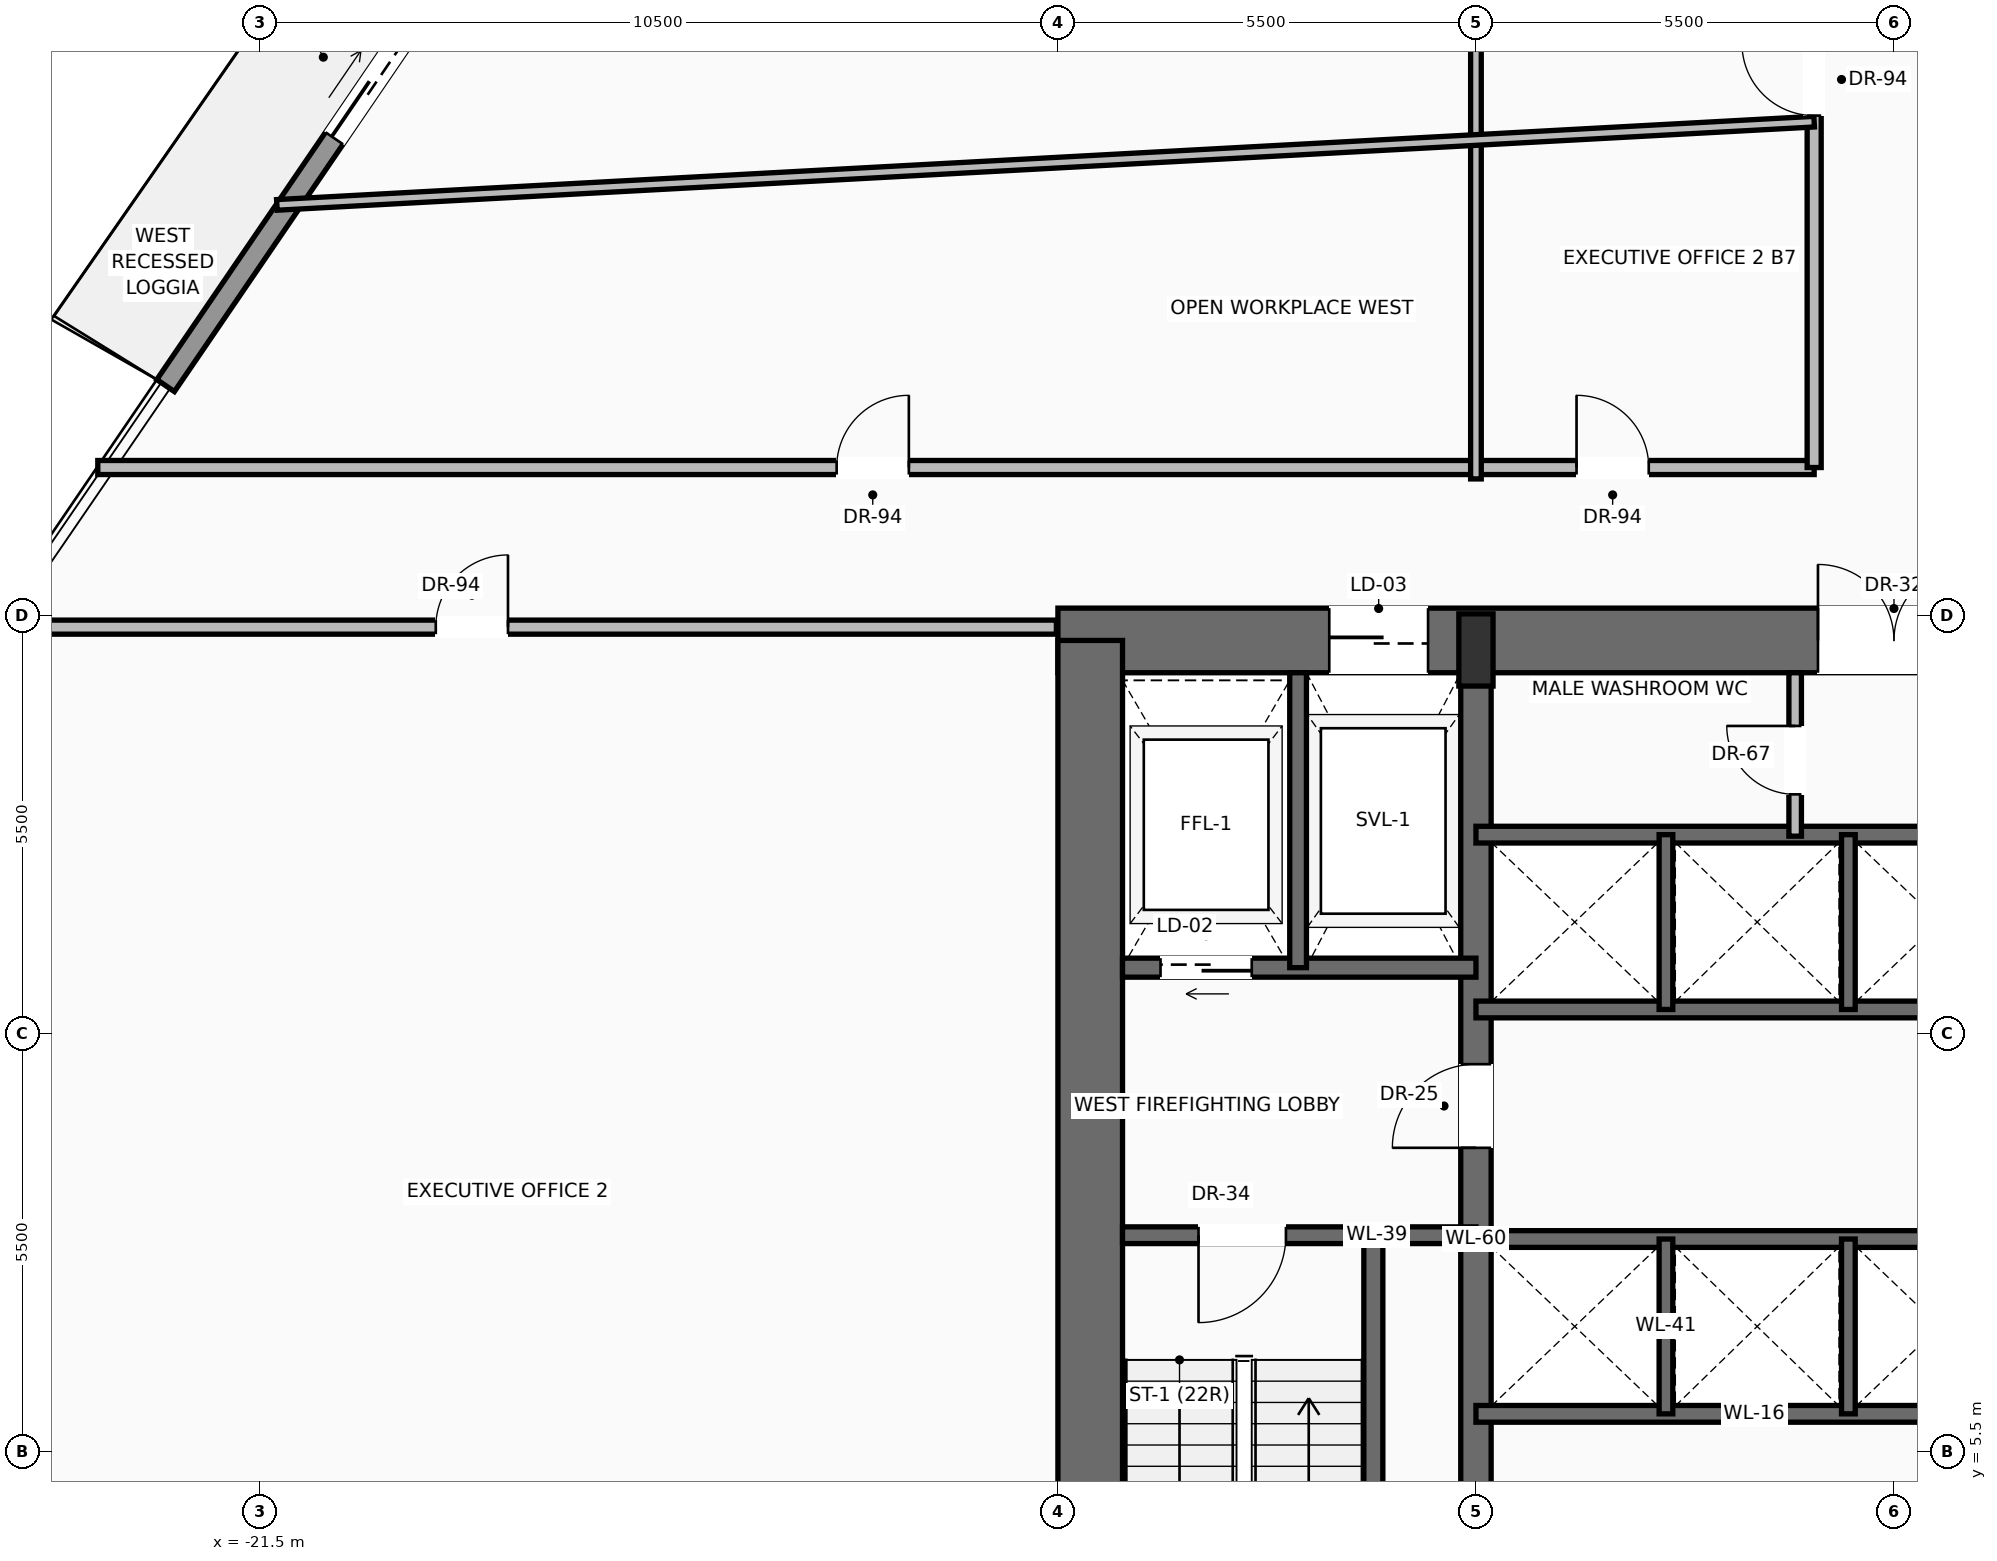
"""IFC4 building model, lengths in metres.
Left out: names, types, materials, properties, quantities, classifications, styles, units other than length and angle.
Written with IfcOpenShell. Run it as: python <this file> out.ifc"""

import sys

from ifc_helpers import new_model, si_unit, direction, frame, frame_2d, origin, origin_2d, place, context, subcontext, project, spatial, rectangle, extrude, source, transform, mapped, element, fill, save


model = new_model("IFC4")
c1 = context("Model", 3, precision=1e-05, world=origin(), true_north=direction((0.0, 1.0)))
c2 = subcontext(c1, "Body", "Model", "MODEL_VIEW")
j1 = project(units=[si_unit("LENGTHUNIT", "METRE"), si_unit("PLANEANGLEUNIT", "RADIAN")], contexts=[c1])
p1 = place(None, origin())
s1 = spatial("IfcSite", under=j1, at=p1, CompositionType="ELEMENT")
p2 = place(p1, origin())
s2 = spatial("IfcBuilding", under=s1, at=p2, CompositionType="ELEMENT")
p3 = place(p2, frame((0.0, 0.0, 34.9)))
s3 = spatial("IfcBuildingStorey", under=s2, at=p3, CompositionType="ELEMENT", Elevation=34.9)
p4 = place(p3, frame((-11.0, 16.175, 0.0), z_axis=(0.0, 0.0, 1.0), x_axis=(1.0, 0.0, 0.0)))
e1 = element("IfcWall", 1, at=p4, inside=s3, PredefinedType="SHEAR", context=c2, shape_type="SweptSolid", body=[
    extrude(rectangle(XDim=22.0, YDim=0.85, at=frame_2d((11.0, 0.0))), origin(), (0.0, 0.0, 1.0), 3.45),
])
p5 = place(p4, frame((3.57, 0.0, 0.0)))
e2 = element("IfcOpeningElement", 2, at=p5, cuts=e1, PredefinedType="OPENING", context=c2, shape_type="SweptSolid", body=[
    extrude(rectangle(XDim=1.3, YDim=2.3, at=frame_2d((0.65, 1.15))), frame((0.0, 0.435, 0.0), z_axis=(0.0, -1.0, 0.0), x_axis=(1.0, 0.0, 0.0)), (0.0, 0.0, 1.0), 0.87),
])
p6 = place(p4, frame((10.0, 0.0, 0.0)))
e3 = element("IfcOpeningElement", 3, at=p6, cuts=e1, PredefinedType="OPENING", context=c2, shape_type="SweptSolid", body=[
    extrude(rectangle(XDim=2.0, YDim=2.4, at=frame_2d((1.0, 1.2))), frame((0.0, 0.435, 0.0), z_axis=(0.0, -1.0, 0.0), x_axis=(1.0, 0.0, 0.0)), (0.0, 0.0, 1.0), 0.87),
])
p7 = place(p3, frame((-10.575, 0.425, 0.0), z_axis=(0.0, 0.0, 1.0), x_axis=(0.0, 1.0, 0.0)))
e4 = element("IfcWall", 4, at=p7, inside=s3, PredefinedType="SHEAR", context=c2, shape_type="SweptSolid", body=[
    extrude(rectangle(XDim=15.75, YDim=0.85, at=frame_2d((7.875, 0.0))), origin(), (0.0, 0.0, 1.0), 3.45),
])
p8 = place(p3, frame((-5.5, 0.425, 0.0), z_axis=(0.0, 0.0, 1.0), x_axis=(0.0, 1.0, 0.0)))
e5 = element("IfcWall", 5, at=p8, inside=s3, PredefinedType="SHEAR", context=c2, shape_type="SweptSolid", body=[
    extrude(rectangle(XDim=15.75, YDim=0.4, at=frame_2d((7.875, 0.0))), origin(), (0.0, 0.0, 1.0), 3.45),
])
p9 = place(p8, frame((9.075, 0.0, 0.0)))
e6 = element("IfcOpeningElement", 6, at=p9, cuts=e5, PredefinedType="OPENING", context=c2, shape_type="SweptSolid", body=[
    extrude(rectangle(XDim=1.1, YDim=2.2, at=frame_2d((0.55, 1.1))), frame((0.0, 0.21, 0.0), z_axis=(0.0, -1.0, 0.0), x_axis=(1.0, 0.0, 0.0)), (0.0, 0.0, 1.0), 0.42),
])
m1 = source(origin(), c2, "Body", "SweptSolid", [
    extrude(rectangle(XDim=0.45, YDim=0.95, at=origin_2d()), origin(), (0.0, 0.0, 1.0), 3.7),
])
p10 = place(p3, frame((-5.5, 16.05, 0.0), z_axis=(0.0, 0.0, 1.0), x_axis=(1.0, 0.0, 0.0)))
e7 = element("IfcColumn", 7, at=p10, inside=s3, PredefinedType="PILASTER", context=c2, shape_type="MappedRepresentation", body=[
    mapped(m1, transform((0.0, 0.0, 0.0), scale=1.0)),
])
p11 = place(p3, frame((-22.74, 19.528, 0.0), z_axis=(0.0, 0.0, 1.0), x_axis=(0.563410685264, 0.826176978455, 0.0)))
e8 = element("IfcWall", 8, at=p11, inside=s3, PredefinedType="SOLIDWALL", context=c2, shape_type="SweptSolid", body=[
    extrude(rectangle(XDim=16.41, YDim=0.28, at=frame_2d((8.205, 0.0))), origin(), (0.0, 0.0, 1.0), 3.03),
])
p12 = place(p11, frame((3.938, 0.0, 0.0)))
e9 = element("IfcOpeningElement", 9, at=p12, cuts=e8, PredefinedType="OPENING", context=c2, shape_type="SweptSolid", body=[
    extrude(rectangle(XDim=1.6, YDim=2.35, at=frame_2d((0.8, 1.175))), frame((0.0, 0.15, 0.0), z_axis=(0.0, -1.0, 0.0), x_axis=(1.0, 0.0, 0.0)), (0.0, 0.0, 1.0), 0.3),
])
p13 = place(p11, frame((11.159, 0.0, 0.9)))
e10 = element("IfcOpeningElement", 10, at=p13, cuts=e8, PredefinedType="OPENING", context=c2, shape_type="SweptSolid", body=[
    extrude(rectangle(XDim=1.55, YDim=1.85, at=frame_2d((0.775, 0.925))), frame((0.0, 0.15, 0.0), z_axis=(0.0, -1.0, 0.0), x_axis=(1.0, 0.0, 0.0)), (0.0, 0.0, 1.0), 0.3),
])
p14 = place(p3, frame((-6.85, 0.85, 0.0), z_axis=(0.0, 0.0, 1.0), x_axis=(0.0, 1.0, 0.0)))
e11 = element("IfcWall", 11, at=p14, inside=s3, PredefinedType="SOLIDWALL", context=c2, shape_type="SweptSolid", body=[
    extrude(rectangle(XDim=7.5, YDim=0.25, at=frame_2d((3.75, 0.0))), origin(), (0.0, 0.0, 1.0), 3.45),
])
p15 = place(p3, frame((-5.5, 8.35, 0.0), z_axis=(0.0, 0.0, 1.0), x_axis=(-1.0, 0.0, 0.0)))
e12 = element("IfcWall", 12, at=p15, inside=s3, PredefinedType="SOLIDWALL", context=c2, shape_type="SweptSolid", body=[
    extrude(rectangle(XDim=4.65, YDim=0.22, at=frame_2d((2.325, 0.0))), origin(), (0.0, 0.0, 1.0), 3.45),
])
p16 = place(p15, frame((2.5, 0.0, 0.0)))
e13 = element("IfcOpeningElement", 13, at=p16, cuts=e12, PredefinedType="OPENING", context=c2, shape_type="SweptSolid", body=[
    extrude(rectangle(XDim=1.15, YDim=2.2, at=frame_2d((0.575, 1.1))), frame((0.0, 0.12, 0.0), z_axis=(0.0, -1.0, 0.0), x_axis=(1.0, 0.0, 0.0)), (0.0, 0.0, 1.0), 0.24),
])
p17 = place(p3, frame((-5.5, 11.87, 0.0), z_axis=(0.0, 0.0, 1.0), x_axis=(-1.0, 0.0, 0.0)))
e14 = element("IfcWall", 14, at=p17, inside=s3, PredefinedType="SOLIDWALL", context=c2, shape_type="SweptSolid", body=[
    extrude(rectangle(XDim=4.65, YDim=0.25, at=frame_2d((2.325, 0.0))), origin(), (0.0, 0.0, 1.0), 3.45),
])
p18 = place(p17, frame((2.95, 0.0, 0.0)))
e15 = element("IfcOpeningElement", 15, at=p18, cuts=e14, PredefinedType="OPENING", context=c2, shape_type="SweptSolid", body=[
    extrude(rectangle(XDim=1.2, YDim=2.25, at=frame_2d((0.6, 1.125))), frame((0.0, 0.135, 0.0), z_axis=(0.0, -1.0, 0.0), x_axis=(1.0, 0.0, 0.0)), (0.0, 0.0, 1.0), 0.27),
])
p19 = place(p3, frame((-7.84, 11.87, 0.0), z_axis=(0.0, 0.0, 1.0), x_axis=(0.0, 1.0, 0.0)))
e16 = element("IfcWall", 16, at=p19, inside=s3, PredefinedType="SOLIDWALL", context=c2, shape_type="SweptSolid", body=[
    extrude(rectangle(XDim=3.88, YDim=0.22, at=frame_2d((1.94, 0.0))), origin(), (0.0, 0.0, 1.0), 3.45),
])
for number, where, z_axis, x_axis in (
    (17, (-5.5, 6.0, 0.0), (0.0, 0.0, 1.0), (1.0, 0.0, 0.0)),
    (18, (-5.5, 8.3, 0.0), (0.0, 0.0, 1.0), (1.0, 0.0, 0.0)),
):
    element("IfcWall", number, at=place(p3, frame(where, z_axis=z_axis, x_axis=x_axis)), inside=s3, PredefinedType="SOLIDWALL", context=c2, shape_type="SweptSolid", body=[
        extrude(rectangle(XDim=7.32, YDim=0.22, at=frame_2d((3.66, 0.0))), origin(), (0.0, 0.0, 1.0), 3.45),
    ])
for number, where, z_axis, x_axis in (
    (19, (-3.0, 6.0, 0.0), (0.0, 0.0, 1.0), (0.0, 1.0, 0.0)),
    (20, (-0.6, 6.0, 0.0), (0.0, 0.0, 1.0), (0.0, 1.0, 0.0)),
):
    element("IfcWall", number, at=place(p3, frame(where, z_axis=z_axis, x_axis=x_axis)), inside=s3, PredefinedType="SOLIDWALL", context=c2, shape_type="SweptSolid", body=[
        extrude(rectangle(XDim=2.3, YDim=0.18, at=frame_2d((1.15, 0.0))), origin(), (0.0, 0.0, 1.0), 3.45),
    ])
for number, where, z_axis, x_axis in (
    (21, (-5.5, 11.32, 0.0), (0.0, 0.0, 1.0), (1.0, 0.0, 0.0)),
    (22, (-5.5, 13.62, 0.0), (0.0, 0.0, 1.0), (1.0, 0.0, 0.0)),
):
    element("IfcWall", number, at=place(p3, frame(where, z_axis=z_axis, x_axis=x_axis)), inside=s3, PredefinedType="SOLIDWALL", context=c2, shape_type="SweptSolid", body=[
        extrude(rectangle(XDim=7.32, YDim=0.22, at=frame_2d((3.66, 0.0))), origin(), (0.0, 0.0, 1.0), 3.45),
    ])
for number, where, z_axis, x_axis in (
    (23, (-3.0, 11.32, 0.0), (0.0, 0.0, 1.0), (0.0, 1.0, 0.0)),
    (24, (-0.6, 11.32, 0.0), (0.0, 0.0, 1.0), (0.0, 1.0, 0.0)),
):
    element("IfcWall", number, at=place(p3, frame(where, z_axis=z_axis, x_axis=x_axis)), inside=s3, PredefinedType="SOLIDWALL", context=c2, shape_type="SweptSolid", body=[
        extrude(rectangle(XDim=2.3, YDim=0.18, at=frame_2d((1.15, 0.0))), origin(), (0.0, 0.0, 1.0), 3.45),
    ])
p20 = place(p3, frame((-1.3, 13.6, 0.0), z_axis=(0.0, 0.0, 1.0), x_axis=(0.0, 1.0, 0.0)))
e25 = element("IfcWall", 25, at=p20, inside=s3, PredefinedType="PARTITIONING", context=c2, shape_type="SweptSolid", body=[
    extrude(rectangle(XDim=2.15, YDim=0.165, at=frame_2d((1.075, 0.0))), origin(), (0.0, 0.0, 1.0), 3.442),
])
p21 = place(p20, frame((0.55, 0.0, 0.0)))
e26 = element("IfcOpeningElement", 26, at=p21, cuts=e25, PredefinedType="OPENING", context=c2, shape_type="SweptSolid", body=[
    extrude(rectangle(XDim=0.9, YDim=2.1, at=frame_2d((0.45, 1.05))), frame((0.0, 0.093, 0.0), z_axis=(0.0, -1.0, 0.0), x_axis=(1.0, 0.0, 0.0)), (0.0, 0.0, 1.0), 0.185),
])
p22 = place(p3, frame((-25.064, 16.35, 0.0), z_axis=(0.0, 0.0, 1.0), x_axis=(1.0, 0.0, 0.0)))
e27 = element("IfcWall", 27, at=p22, inside=s3, PredefinedType="PARTITIONING", context=c2, shape_type="SweptSolid", body=[
    extrude(rectangle(XDim=14.044, YDim=0.185, at=frame_2d((7.022, 0.0))), origin(), (0.0, 0.0, 1.0), 2.747),
])
p23 = place(p22, frame((5.879, 0.0, 0.0)))
e28 = element("IfcOpeningElement", 28, at=p23, cuts=e27, PredefinedType="OPENING", context=c2, shape_type="SweptSolid", body=[
    extrude(rectangle(XDim=0.95, YDim=2.2, at=frame_2d((0.475, 1.1))), frame((0.0, 0.103, 0.0), z_axis=(0.0, -1.0, 0.0), x_axis=(1.0, 0.0, 0.0)), (0.0, 0.0, 1.0), 0.205),
])
p24 = place(p3, frame((-23.632, 18.45, 0.0), z_axis=(0.0, 0.0, 1.0), x_axis=(1.0, 0.0, 0.0)))
e29 = element("IfcWall", 29, at=p24, inside=s3, PredefinedType="PARTITIONING", context=c2, shape_type="SweptSolid", body=[
    extrude(rectangle(XDim=22.582, YDim=0.185, at=frame_2d((11.291, 0.0))), origin(), (0.0, 0.0, 1.0), 2.747),
])
p25 = place(p24, frame((9.721, 0.0, 0.0)))
e30 = element("IfcOpeningElement", 30, at=p25, cuts=e29, PredefinedType="OPENING", context=c2, shape_type="SweptSolid", body=[
    extrude(rectangle(XDim=0.95, YDim=2.2, at=frame_2d((0.475, 1.1))), frame((0.0, 0.103, 0.0), z_axis=(0.0, -1.0, 0.0), x_axis=(1.0, 0.0, 0.0)), (0.0, 0.0, 1.0), 0.205),
])
p26 = place(p24, frame((19.456, 0.0, 0.0)))
e31 = element("IfcOpeningElement", 31, at=p26, cuts=e29, PredefinedType="OPENING", context=c2, shape_type="SweptSolid", body=[
    extrude(rectangle(XDim=0.95, YDim=2.2, at=frame_2d((0.475, 1.1))), frame((0.0, 0.103, 0.0), z_axis=(0.0, -1.0, 0.0), x_axis=(1.0, 0.0, 0.0)), (0.0, 0.0, 1.0), 0.205),
])
p27 = place(p3, frame((-1.05, 18.45, 0.0), z_axis=(0.0, 0.0, 1.0), x_axis=(0.0, 1.0, 0.0)))
e32 = element("IfcWall", 32, at=p27, inside=s3, PredefinedType="PARTITIONING", context=c2, shape_type="SweptSolid", body=[
    extrude(rectangle(XDim=14.05, YDim=0.185, at=frame_2d((7.025, 0.0))), origin(), (0.0, 0.0, 1.0), 2.747),
])
p28 = place(p27, frame((4.63, 0.0, 0.0)))
e33 = element("IfcOpeningElement", 33, at=p28, cuts=e32, PredefinedType="OPENING", context=c2, shape_type="SweptSolid", body=[
    extrude(rectangle(XDim=0.95, YDim=2.2, at=frame_2d((0.475, 1.1))), frame((0.0, 0.103, 0.0), z_axis=(0.0, -1.0, 0.0), x_axis=(1.0, 0.0, 0.0)), (0.0, 0.0, 1.0), 0.205),
])
p29 = place(p3, frame((-5.5, 18.3, 0.0), z_axis=(0.0, 0.0, 1.0), x_axis=(0.0, 1.0, 0.0)))
e34 = element("IfcWall", 34, at=p29, inside=s3, PredefinedType="PARTITIONING", context=c2, shape_type="SweptSolid", body=[
    extrude(rectangle(XDim=13.2, YDim=0.14, at=frame_2d((6.6, 0.0))), origin(), (0.0, 0.0, 1.0), 2.747),
])
p30 = place(p29, frame((9.065, 0.0, 0.0)))
e35 = element("IfcOpeningElement", 35, at=p30, cuts=e34, PredefinedType="OPENING", context=c2, shape_type="SweptSolid", body=[
    extrude(rectangle(XDim=0.95, YDim=2.2, at=frame_2d((0.475, 1.1))), frame((0.0, 0.08, 0.0), z_axis=(0.0, -1.0, 0.0), x_axis=(1.0, 0.0, 0.0)), (0.0, 0.0, 1.0), 0.16),
])
p31 = place(p3, frame((-21.276, 21.905, 0.0), z_axis=(0.0, 0.0, 1.0), x_axis=(0.998537212519, 0.054068800745, 0.0)))
e36 = element("IfcWall", 36, at=p31, inside=s3, PredefinedType="PARTITIONING", context=c2, shape_type="SweptSolid", body=[
    extrude(rectangle(XDim=20.256, YDim=0.14, at=frame_2d((10.128, 0.0))), origin(), (0.0, 0.0, 1.0), 2.747),
])
m2 = source(origin(), c2, "Body", "SweptSolid", [
    extrude(rectangle(XDim=1.6, YDim=2.35, at=frame_2d((0.8, 1.175))), frame((0.0, 0.025, 0.0), z_axis=(0.0, -1.0, 0.0), x_axis=(1.0, 0.0, 0.0)), (0.0, 0.0, 1.0), 0.05),
])
p32 = place(p12, origin())
e37 = element("IfcDoor", 37, at=p32, inside=s3, OperationType="SLIDING_TO_LEFT", PredefinedType="DOOR", context=c2, shape_type="MappedRepresentation", body=[
    mapped(m2, transform((0.0, 0.0, 0.0), scale=1.0)),
])
fill(e9, e37)
m3 = source(origin(), c2, "Body", "SweptSolid", [
    extrude(rectangle(XDim=1.15, YDim=2.2, at=frame_2d((0.575, 1.1))), frame((0.0, 0.025, 0.0), z_axis=(0.0, -1.0, 0.0), x_axis=(1.0, 0.0, 0.0)), (0.0, 0.0, 1.0), 0.05),
])
p33 = place(p16, origin())
e38 = element("IfcDoor", 38, at=p33, inside=s3, OperationType="SINGLE_SWING_RIGHT", PredefinedType="DOOR", context=c2, shape_type="MappedRepresentation", body=[
    mapped(m3, transform((0.0, 0.0, 0.0), scale=1.0)),
])
fill(e13, e38)
m4 = source(origin(), c2, "Body", "SweptSolid", [
    extrude(rectangle(XDim=1.1, YDim=2.2, at=frame_2d((0.55, 1.1))), frame((0.0, 0.025, 0.0), z_axis=(0.0, -1.0, 0.0), x_axis=(1.0, 0.0, 0.0)), (0.0, 0.0, 1.0), 0.05),
])
p34 = place(p9, origin())
e39 = element("IfcDoor", 39, at=p34, inside=s3, OperationType="SINGLE_SWING_LEFT", PredefinedType="DOOR", context=c2, shape_type="MappedRepresentation", body=[
    mapped(m4, transform((0.0, 0.0, 0.0), scale=1.0)),
])
fill(e6, e39)
m5 = source(origin(), c2, "Body", "SweptSolid", [
    extrude(rectangle(XDim=1.2, YDim=2.25, at=frame_2d((0.6, 1.125))), frame((0.0, 0.025, 0.0), z_axis=(0.0, -1.0, 0.0), x_axis=(1.0, 0.0, 0.0)), (0.0, 0.0, 1.0), 0.05),
])
p35 = place(p18, origin())
e40 = element("IfcDoor", 40, at=p35, inside=s3, OperationType="SLIDING_TO_LEFT", PredefinedType="DOOR", context=c2, shape_type="MappedRepresentation", body=[
    mapped(m5, transform((0.0, 0.0, 0.0), scale=1.0)),
])
fill(e15, e40)
m6 = source(origin(), c2, "Body", "SweptSolid", [
    extrude(rectangle(XDim=1.3, YDim=2.3, at=frame_2d((0.65, 1.15))), frame((0.0, 0.025, 0.0), z_axis=(0.0, -1.0, 0.0), x_axis=(1.0, 0.0, 0.0)), (0.0, 0.0, 1.0), 0.05),
])
p36 = place(p5, origin())
e41 = element("IfcDoor", 41, at=p36, inside=s3, OperationType="SLIDING_TO_RIGHT", PredefinedType="DOOR", context=c2, shape_type="MappedRepresentation", body=[
    mapped(m6, transform((0.0, 0.0, 0.0), scale=1.0)),
])
fill(e2, e41)
m7 = source(origin(), c2, "Body", "SweptSolid", [
    extrude(rectangle(XDim=2.0, YDim=2.4, at=frame_2d((1.0, 1.2))), frame((0.0, 0.025, 0.0), z_axis=(0.0, -1.0, 0.0), x_axis=(1.0, 0.0, 0.0)), (0.0, 0.0, 1.0), 0.05),
])
p37 = place(p6, origin())
e42 = element("IfcDoor", 42, at=p37, inside=s3, OperationType="DOUBLE_DOOR_SINGLE_SWING", PredefinedType="DOOR", context=c2, shape_type="MappedRepresentation", body=[
    mapped(m7, transform((0.0, 0.0, 0.0), scale=1.0)),
])
fill(e3, e42)
m8 = source(origin(), c2, "Body", "SweptSolid", [
    extrude(rectangle(XDim=0.9, YDim=2.1, at=frame_2d((0.45, 1.05))), frame((0.0, 0.025, 0.0), z_axis=(0.0, -1.0, 0.0), x_axis=(1.0, 0.0, 0.0)), (0.0, 0.0, 1.0), 0.05),
])
p38 = place(p21, origin())
e43 = element("IfcDoor", 43, at=p38, inside=s3, OperationType="SINGLE_SWING_RIGHT", PredefinedType="DOOR", context=c2, shape_type="MappedRepresentation", body=[
    mapped(m8, transform((0.0, 0.0, 0.0), scale=1.0)),
])
fill(e26, e43)
m9 = source(origin(), c2, "Body", "SweptSolid", [
    extrude(rectangle(XDim=0.95, YDim=2.2, at=frame_2d((0.475, 1.1))), frame((0.0, 0.025, 0.0), z_axis=(0.0, -1.0, 0.0), x_axis=(1.0, 0.0, 0.0)), (0.0, 0.0, 1.0), 0.05),
])
p39 = place(p23, origin())
e44 = element("IfcDoor", 44, at=p39, inside=s3, OperationType="SINGLE_SWING_RIGHT", PredefinedType="DOOR", context=c2, shape_type="MappedRepresentation", body=[
    mapped(m9, transform((0.0, 0.0, 0.0), scale=1.0)),
])
fill(e28, e44)
p40 = place(p25, origin())
e45 = element("IfcDoor", 45, at=p40, inside=s3, OperationType="SINGLE_SWING_RIGHT", PredefinedType="DOOR", context=c2, shape_type="MappedRepresentation", body=[
    mapped(m9, transform((0.0, 0.0, 0.0), scale=1.0)),
])
fill(e30, e45)
p41 = place(p28, origin())
e46 = element("IfcDoor", 46, at=p41, inside=s3, OperationType="SINGLE_SWING_RIGHT", PredefinedType="DOOR", context=c2, shape_type="MappedRepresentation", body=[
    mapped(m9, transform((0.0, 0.0, 0.0), scale=1.0)),
])
fill(e33, e46)
p42 = place(p26, origin())
e47 = element("IfcDoor", 47, at=p42, inside=s3, OperationType="SINGLE_SWING_LEFT", PredefinedType="DOOR", context=c2, shape_type="MappedRepresentation", body=[
    mapped(m9, transform((0.0, 0.0, 0.0), scale=1.0)),
])
fill(e31, e47)
save(model, sys.argv[1])
